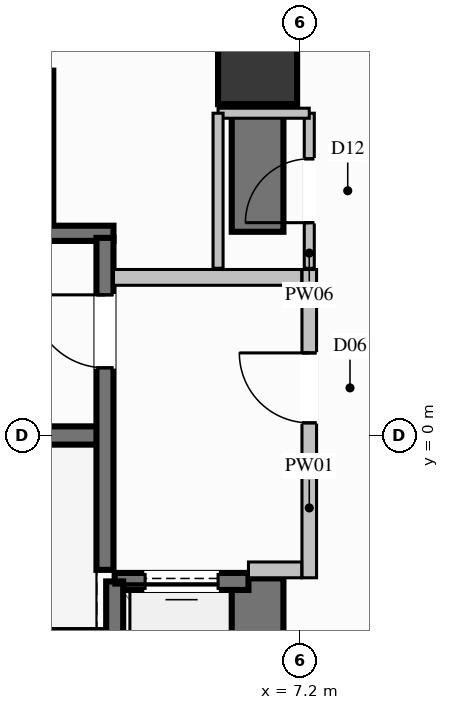
"""IFC4 building model, lengths in metres.
Left out: names, types, materials, properties, quantities, classifications, styles, units other than length and angle.
Written with IfcOpenShell. Run it as: python <this file> out.ifc"""

import sys

from ifc_helpers import new_model, si_unit, direction, frame, frame_2d, origin, origin_2d, place, context, subcontext, project, spatial, rectangle, extrude, element, fill, save


model = new_model("IFC4")
c1 = context("Model", 3, precision=1e-05, world=origin(), true_north=direction((0.0, 1.0)))
c2 = subcontext(c1, "Body", "Model", "MODEL_VIEW")
j1 = project(units=[si_unit("LENGTHUNIT", "METRE"), si_unit("PLANEANGLEUNIT", "RADIAN")], contexts=[c1])
p1 = place(None, origin())
s1 = spatial("IfcSite", under=j1, at=p1, CompositionType="ELEMENT")
p2 = place(p1, origin())
s2 = spatial("IfcBuilding", under=s1, at=p2, CompositionType="ELEMENT")
p3 = place(p2, frame((0.0, 0.0, 23.6)))
s3 = spatial("IfcBuildingStorey", under=s2, at=p3, CompositionType="ELEMENT", Elevation=23.6)
p4 = place(p3, frame((6.5, 6.1, 0.0), z_axis=(0.0, 0.0, 1.0), x_axis=(1.0, 0.0, 0.0)))
e1 = element("IfcColumn", 1, at=p4, inside=s3, PredefinedType="COLUMN", context=c2, shape_type="SweptSolid", body=[
    extrude(rectangle(XDim=1.3, YDim=1.3, at=origin_2d()), origin(), (0.0, 0.0, 1.0), 4.8),
])
p5 = place(p3, frame((-3.99, 0.0, 0.0), z_axis=(0.0, 0.0, 1.0), x_axis=(1.0, 0.0, 0.0)))
e2 = element("IfcWall", 2, at=p5, inside=s3, PredefinedType="SHEAR", context=c2, shape_type="SweptSolid", body=[
    extrude(rectangle(XDim=7.98, YDim=0.3, at=frame_2d((3.99, 0.0))), origin(), (0.0, 0.0, 1.0), 4.8),
])
for number, where, z_axis, x_axis in (
    (3, (-4.13, -3.325, 0.0), (0.0, 0.0, 1.0), (1.0, 0.0, 0.0)),
    (4, (-4.13, 3.325, 0.0), (0.0, 0.0, 1.0), (1.0, 0.0, 0.0)),
):
    element("IfcWall", number, at=place(p3, frame(where, z_axis=z_axis, x_axis=x_axis)), inside=s3, PredefinedType="SOLIDWALL", context=c2, shape_type="SweptSolid", body=[
        extrude(rectangle(XDim=8.26, YDim=0.25, at=frame_2d((4.13, 0.0))), origin(), (0.0, 0.0, 1.0), 4.8),
    ])
p6 = place(p3, frame((5.85, 6.1, 0.0), z_axis=(0.0, 0.0, 1.0), x_axis=(1.0, 0.0, 0.0)))
e5 = element("IfcWall", 5, at=p6, inside=s3, PredefinedType="SHEAR", context=c2, shape_type="SweptSolid", body=[
    extrude(rectangle(XDim=0.225, YDim=0.85, at=frame_2d((0.112, 0.0))), origin(), (0.0, 0.0, 1.0), 4.8),
])
p7 = place(p3, frame((6.5, -6.525, 0.0), z_axis=(0.0, 0.0, 1.0), x_axis=(0.0, 1.0, 0.0)))
e6 = element("IfcWall", 6, at=p7, inside=s3, PredefinedType="SHEAR", context=c2, shape_type="SweptSolid", body=[
    extrude(rectangle(XDim=4.175, YDim=0.85, at=frame_2d((2.087, 0.0))), origin(), (0.0, 0.0, 1.0), 4.8),
])
p8 = place(p3, frame((6.5, 3.35, 0.0), z_axis=(0.0, 0.0, 1.0), x_axis=(0.0, 1.0, 0.0)))
e7 = element("IfcWall", 7, at=p8, inside=s3, PredefinedType="SHEAR", context=c2, shape_type="SweptSolid", body=[
    extrude(rectangle(XDim=3.175, YDim=0.85, at=frame_2d((1.587, 0.0))), origin(), (0.0, 0.0, 1.0), 4.8),
])
p9 = place(p3, frame((3.0, 3.5, 0.0), z_axis=(0.0, 0.0, 1.0), x_axis=(0.0, 1.0, 0.0)))
e8 = element("IfcWall", 8, at=p9, inside=s3, PredefinedType="SOLIDWALL", context=c2, shape_type="SweptSolid", body=[
    extrude(rectangle(XDim=2.5, YDim=0.28, at=frame_2d((1.25, 0.0))), origin(), (0.0, 0.0, 1.0), 4.54),
])
p10 = place(p3, frame((6.35, -2.4, 0.0), z_axis=(0.0, 0.0, 1.0), x_axis=(-1.0, 0.0, 0.0)))
e9 = element("IfcWall", 9, at=p10, inside=s3, PredefinedType="SOLIDWALL", context=c2, shape_type="SweptSolid", body=[
    extrude(rectangle(XDim=2.2, YDim=0.28, at=frame_2d((1.1, 0.0))), origin(), (0.0, 0.0, 1.0), 4.54),
])
p11 = place(p10, frame((0.5, 0.0, 0.0)))
e10 = element("IfcOpeningElement", 10, at=p11, cuts=e9, PredefinedType="OPENING", context=c2, shape_type="SweptSolid", body=[
    extrude(rectangle(XDim=1.2, YDim=2.2, at=frame_2d((0.6, 1.1))), frame((0.0, 0.15, 0.0), z_axis=(0.0, -1.0, 0.0), x_axis=(1.0, 0.0, 0.0)), (0.0, 0.0, 1.0), 0.3),
])
p12 = place(p3, frame((4.15, -2.4, 0.0), z_axis=(0.0, 0.0, 1.0), x_axis=(0.0, -1.0, 0.0)))
e11 = element("IfcWall", 11, at=p12, inside=s3, PredefinedType="SOLIDWALL", context=c2, shape_type="SweptSolid", body=[
    extrude(rectangle(XDim=2.7, YDim=0.28, at=frame_2d((1.35, 0.0))), origin(), (0.0, 0.0, 1.0), 4.54),
])
p13 = place(p3, frame((3.99, -2.21, 0.0), z_axis=(0.0, 0.0, 1.0), x_axis=(0.0, 1.0, 0.0)))
e12 = element("IfcWall", 12, at=p13, inside=s3, PredefinedType="SOLIDWALL", context=c2, shape_type="SweptSolid", body=[
    extrude(rectangle(XDim=5.46, YDim=0.28, at=frame_2d((2.73, 0.0))), origin(), (0.0, 0.0, 1.0), 4.54),
])
p14 = place(p13, frame((3.323, 0.0, 0.0)))
e13 = element("IfcOpeningElement", 13, at=p14, cuts=e12, PredefinedType="OPENING", context=c2, shape_type="SweptSolid", body=[
    extrude(rectangle(XDim=1.2, YDim=2.2, at=frame_2d((0.6, 1.1))), frame((0.0, 0.15, 0.0), z_axis=(0.0, -1.0, 0.0), x_axis=(1.0, 0.0, 0.0)), (0.0, 0.0, 1.0), 0.3),
])
p15 = place(p3, frame((7.35, -2.34, 0.0), z_axis=(0.0, 0.0, 1.0), x_axis=(0.0, 1.0, 0.0)))
e14 = element("IfcWall", 14, at=p15, inside=s3, PredefinedType="PARTITIONING", context=c2, shape_type="SweptSolid", body=[
    extrude(rectangle(XDim=5.07, YDim=0.24, at=frame_2d((2.535, 0.0))), origin(), (0.0, 0.0, 1.0), 2.725),
])
p16 = place(p15, frame((2.548, 0.0, 0.0)))
e15 = element("IfcOpeningElement", 15, at=p16, cuts=e14, PredefinedType="OPENING", context=c2, shape_type="SweptSolid", body=[
    extrude(rectangle(XDim=1.15, YDim=2.2, at=frame_2d((0.575, 1.1))), frame((0.0, 0.13, 0.0), z_axis=(0.0, -1.0, 0.0), x_axis=(1.0, 0.0, 0.0)), (0.0, 0.0, 1.0), 0.26),
])
p17 = place(p3, frame((6.35, -2.21, 0.0), z_axis=(0.0, 0.0, 1.0), x_axis=(1.0, 0.0, 0.0)))
e16 = element("IfcWall", 16, at=p17, inside=s3, PredefinedType="PARTITIONING", context=c2, shape_type="SweptSolid", body=[
    extrude(rectangle(XDim=0.875, YDim=0.26, at=frame_2d((0.438, 0.0))), origin(), (0.0, 0.0, 1.0), 4.54),
])
p18 = place(p3, frame((4.13, 2.6, 0.0), z_axis=(0.0, 0.0, 1.0), x_axis=(1.0, 0.0, 0.0)))
e17 = element("IfcWall", 17, at=p18, inside=s3, PredefinedType="PARTITIONING", context=c2, shape_type="SweptSolid", body=[
    extrude(rectangle(XDim=3.095, YDim=0.26, at=frame_2d((1.548, 0.0))), origin(), (0.0, 0.0, 1.0), 4.54),
])
p19 = place(p3, frame((7.35, 2.75, 0.0), z_axis=(0.0, 0.0, 1.0), x_axis=(0.0, 1.0, 0.0)))
e18 = element("IfcWall", 18, at=p19, inside=s3, PredefinedType="PARTITIONING", context=c2, shape_type="SweptSolid", body=[
    extrude(rectangle(XDim=2.55, YDim=0.165, at=frame_2d((1.275, 0.0))), origin(), (0.0, 0.0, 1.0), 2.725),
])
p20 = place(p19, frame((0.75, 0.0, 0.0)))
e19 = element("IfcOpeningElement", 19, at=p20, cuts=e18, PredefinedType="OPENING", context=c2, shape_type="SweptSolid", body=[
    extrude(rectangle(XDim=1.05, YDim=2.15, at=frame_2d((0.525, 1.075))), frame((0.0, 0.093, 0.0), z_axis=(0.0, -1.0, 0.0), x_axis=(1.0, 0.0, 0.0)), (0.0, 0.0, 1.0), 0.185),
])
p21 = place(p3, frame((7.35, 5.3, 0.0), z_axis=(0.0, 0.0, 1.0), x_axis=(-1.0, 0.0, 0.0)))
e20 = element("IfcWall", 20, at=p21, inside=s3, PredefinedType="PARTITIONING", context=c2, shape_type="SweptSolid", body=[
    extrude(rectangle(XDim=1.5, YDim=0.165, at=frame_2d((0.75, 0.0))), origin(), (0.0, 0.0, 1.0), 2.725),
])
p22 = place(p3, frame((5.85, 5.3, 0.0), z_axis=(0.0, 0.0, 1.0), x_axis=(0.0, -1.0, 0.0)))
e21 = element("IfcWall", 21, at=p22, inside=s3, PredefinedType="PARTITIONING", context=c2, shape_type="SweptSolid", body=[
    extrude(rectangle(XDim=2.55, YDim=0.165, at=frame_2d((1.275, 0.0))), origin(), (0.0, 0.0, 1.0), 2.725),
])
p23 = place(p11, origin())
e22 = element("IfcDoor", 22, at=p23, inside=s3, OperationType="SLIDING_TO_LEFT", PredefinedType="DOOR", context=c2, shape_type="SweptSolid", body=[
    extrude(rectangle(XDim=1.2, YDim=2.2, at=frame_2d((0.6, 1.1))), frame((0.0, 0.025, 0.0), z_axis=(0.0, -1.0, 0.0), x_axis=(1.0, 0.0, 0.0)), (0.0, 0.0, 1.0), 0.05),
])
fill(e10, e22)
p24 = place(p14, origin())
e23 = element("IfcDoor", 23, at=p24, inside=s3, OperationType="SINGLE_SWING_RIGHT", PredefinedType="DOOR", context=c2, shape_type="SweptSolid", body=[
    extrude(rectangle(XDim=1.2, YDim=2.2, at=frame_2d((0.6, 1.1))), frame((0.0, 0.025, 0.0), z_axis=(0.0, -1.0, 0.0), x_axis=(1.0, 0.0, 0.0)), (0.0, 0.0, 1.0), 0.05),
])
fill(e13, e23)
p25 = place(p16, origin())
e24 = element("IfcDoor", 24, at=p25, inside=s3, OperationType="SINGLE_SWING_RIGHT", PredefinedType="DOOR", context=c2, shape_type="SweptSolid", body=[
    extrude(rectangle(XDim=1.15, YDim=2.2, at=frame_2d((0.575, 1.1))), frame((0.0, 0.025, 0.0), z_axis=(0.0, -1.0, 0.0), x_axis=(1.0, 0.0, 0.0)), (0.0, 0.0, 1.0), 0.05),
])
fill(e15, e24)
p26 = place(p20, origin())
e25 = element("IfcDoor", 25, at=p26, inside=s3, OperationType="SINGLE_SWING_LEFT", PredefinedType="DOOR", context=c2, shape_type="SweptSolid", body=[
    extrude(rectangle(XDim=1.05, YDim=2.15, at=frame_2d((0.525, 1.075))), frame((0.0, 0.025, 0.0), z_axis=(0.0, -1.0, 0.0), x_axis=(1.0, 0.0, 0.0)), (0.0, 0.0, 1.0), 0.05),
])
fill(e19, e25)
save(model, sys.argv[1])
